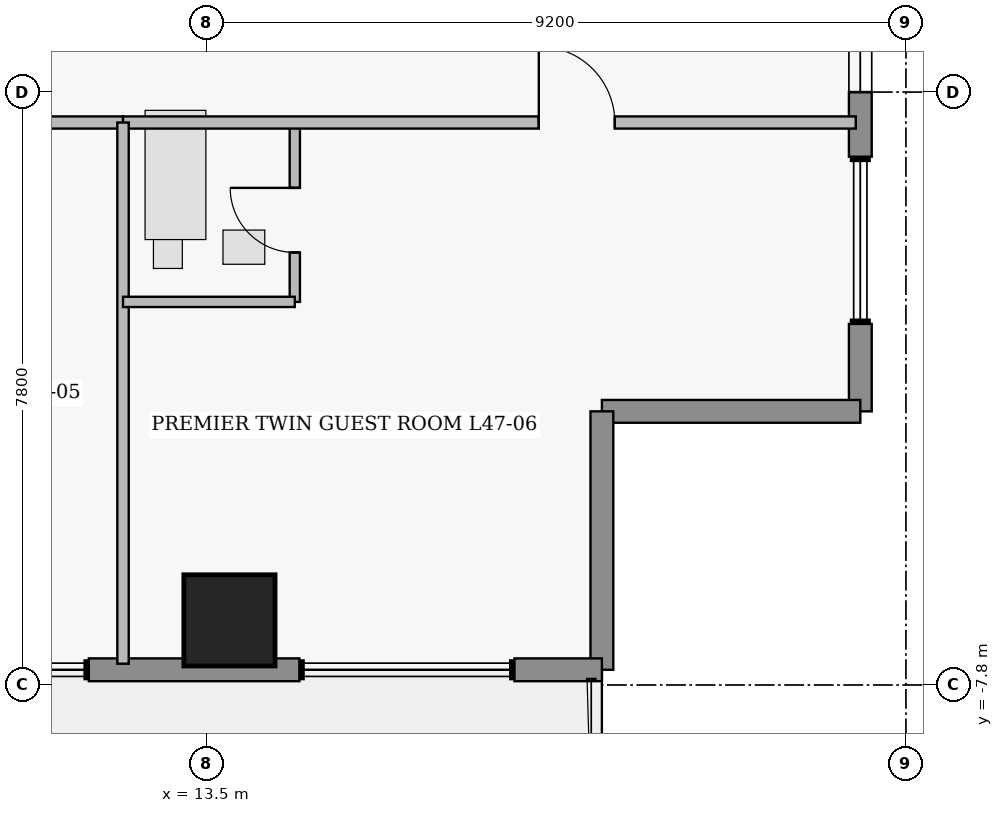
"""IFC4 building model, lengths in metres.
Left out: names, types, materials, properties, quantities, classifications, styles, units other than length and angle.
Written with IfcOpenShell. Run it as: python <this file> out.ifc"""

import sys

from ifc_helpers import new_model, si_unit, direction, frame, frame_2d, origin, origin_2d, place, context, subcontext, project, spatial, rectangle, extrude, element, fill, save


model = new_model("IFC4")
c1 = context("Model", 3, precision=1e-05, world=origin(), true_north=direction((0.0, 1.0)))
c2 = subcontext(c1, "Body", "Model", "MODEL_VIEW")
j1 = project(units=[si_unit("LENGTHUNIT", "METRE"), si_unit("PLANEANGLEUNIT", "RADIAN")], contexts=[c1])
p1 = place(None, origin())
s1 = spatial("IfcSite", under=j1, at=p1, CompositionType="ELEMENT")
p2 = place(p1, origin())
s2 = spatial("IfcBuilding", under=s1, at=p2, CompositionType="ELEMENT")
p3 = place(p2, frame((0.0, 0.0, 188.65)))
s3 = spatial("IfcBuildingStorey", under=s2, at=p3, CompositionType="ELEMENT", Elevation=188.65)
p4 = place(p3, frame((13.8, -6.95, 0.0), z_axis=(0.0, 0.0, 1.0), x_axis=(1.0, 0.0, 0.0)))
e1 = element("IfcColumn", 1, at=p4, inside=s3, PredefinedType="COLUMN", context=c2, shape_type="SweptSolid", body=[
    extrude(rectangle(XDim=1.2, YDim=1.2, at=origin_2d()), origin(), (0.0, 0.0, 1.0), 3.75),
])
p5 = place(p3, frame((22.1, 2.0, 0.0), z_axis=(0.0, 0.0, 1.0), x_axis=(0.0, -1.0, 0.0)))
e2 = element("IfcWall", 2, at=p5, inside=s3, PredefinedType="STANDARD", context=c2, shape_type="SweptSolid", body=[
    extrude(rectangle(XDim=2.85, YDim=0.3, at=frame_2d((1.425, 0.0))), origin(), (0.0, 0.0, 1.0), 3.53),
])
p6 = place(p5, frame((0.85, 0.0, 0.95)))
e3 = element("IfcOpeningElement", 3, at=p6, cuts=e2, PredefinedType="OPENING", context=c2, shape_type="SweptSolid", body=[
    extrude(rectangle(XDim=1.15, YDim=1.55, at=frame_2d((0.575, 0.775))), frame((0.0, 0.16, 0.0), z_axis=(0.0, -1.0, 0.0), x_axis=(1.0, 0.0, 0.0)), (0.0, 0.0, 1.0), 0.32),
])
p7 = place(p3, frame((22.1, -3.05, 0.0), z_axis=(0.0, 0.0, 1.0), x_axis=(0.0, -1.0, 0.0)))
e4 = element("IfcWall", 4, at=p7, inside=s3, PredefinedType="STANDARD", context=c2, shape_type="SweptSolid", body=[
    extrude(rectangle(XDim=1.15, YDim=0.3, at=frame_2d((0.575, 0.0))), origin(), (0.0, 0.0, 1.0), 3.53),
])
for number, where, z_axis, x_axis in (
    (5, (22.1, -4.2, 0.0), (0.0, 0.0, 1.0), (-1.0, 0.0, 0.0)),
    (6, (18.7, -4.2, 0.0), (0.0, 0.0, 1.0), (0.0, -1.0, 0.0)),
):
    element("IfcWall", number, at=place(p3, frame(where, z_axis=z_axis, x_axis=x_axis)), inside=s3, PredefinedType="STANDARD", context=c2, shape_type="SweptSolid", body=[
        extrude(rectangle(XDim=3.4, YDim=0.3, at=frame_2d((1.7, 0.0))), origin(), (0.0, 0.0, 1.0), 3.53),
    ])
p8 = place(p3, frame((18.7, -7.6, 0.0), z_axis=(0.0, 0.0, 1.0), x_axis=(-1.0, 0.0, 0.0)))
e7 = element("IfcWall", 7, at=p8, inside=s3, PredefinedType="STANDARD", context=c2, shape_type="SweptSolid", body=[
    extrude(rectangle(XDim=1.15, YDim=0.3, at=frame_2d((0.575, 0.0))), origin(), (0.0, 0.0, 1.0), 3.53),
])
p9 = place(p3, frame((14.72, -7.6, 0.0), z_axis=(0.0, 0.0, 1.0), x_axis=(-1.0, 0.0, 0.0)))
e8 = element("IfcWall", 8, at=p9, inside=s3, PredefinedType="STANDARD", context=c2, shape_type="SweptSolid", body=[
    extrude(rectangle(XDim=2.77, YDim=0.3, at=frame_2d((1.385, 0.0))), origin(), (0.0, 0.0, 1.0), 3.53),
])
p10 = place(p3, frame((6.2, -0.4, 0.0), z_axis=(0.0, 0.0, 1.0), x_axis=(1.0, 0.0, 0.0)))
e9 = element("IfcWall", 9, at=p10, inside=s3, PredefinedType="PARTITIONING", context=c2, shape_type="SweptSolid", body=[
    extrude(rectangle(XDim=6.2, YDim=0.16, at=frame_2d((3.1, 0.0))), origin(), (0.0, 0.0, 1.0), 3.53),
])
p11 = place(p10, frame((3.775, 0.0, 0.0)))
e10 = element("IfcOpeningElement", 10, at=p11, cuts=e9, PredefinedType="OPENING", context=c2, shape_type="SweptSolid", body=[
    extrude(rectangle(XDim=0.95, YDim=2.15, at=frame_2d((0.475, 1.075))), frame((0.0, 0.09, 0.0), z_axis=(0.0, -1.0, 0.0), x_axis=(1.0, 0.0, 0.0)), (0.0, 0.0, 1.0), 0.18),
])
p12 = place(p3, frame((14.66, -2.76, 0.0), z_axis=(0.0, 0.0, 1.0), x_axis=(0.0, 1.0, 0.0)))
e11 = element("IfcWall", 11, at=p12, inside=s3, PredefinedType="PLUMBINGWALL", context=c2, shape_type="SweptSolid", body=[
    extrude(rectangle(XDim=2.36, YDim=0.135, at=frame_2d((1.18, 0.0))), origin(), (0.0, 0.0, 1.0), 3.53),
])
p13 = place(p12, frame((0.65, 0.0, 0.0)))
e12 = element("IfcOpeningElement", 12, at=p13, cuts=e11, PredefinedType="OPENING", context=c2, shape_type="SweptSolid", body=[
    extrude(rectangle(XDim=0.85, YDim=2.1, at=frame_2d((0.425, 1.05))), frame((0.0, 0.077, 0.0), z_axis=(0.0, -1.0, 0.0), x_axis=(1.0, 0.0, 0.0)), (0.0, 0.0, 1.0), 0.155),
])
p14 = place(p3, frame((12.4, -0.4, 0.0), z_axis=(0.0, 0.0, 1.0), x_axis=(1.0, 0.0, 0.0)))
e13 = element("IfcWall", 13, at=p14, inside=s3, PredefinedType="PARTITIONING", context=c2, shape_type="SweptSolid", body=[
    extrude(rectangle(XDim=9.64, YDim=0.16, at=frame_2d((4.82, 0.0))), origin(), (0.0, 0.0, 1.0), 3.53),
])
p15 = place(p14, frame((5.47, 0.0, 0.0)))
e14 = element("IfcOpeningElement", 14, at=p15, cuts=e13, PredefinedType="OPENING", context=c2, shape_type="SweptSolid", body=[
    extrude(rectangle(XDim=1.0, YDim=2.15, at=frame_2d((0.5, 1.075))), frame((0.0, 0.09, 0.0), z_axis=(0.0, -1.0, 0.0), x_axis=(1.0, 0.0, 0.0)), (0.0, 0.0, 1.0), 0.18),
])
p16 = place(p3, frame((12.4, -7.52, 0.0), z_axis=(0.0, 0.0, 1.0), x_axis=(0.0, 1.0, 0.0)))
e15 = element("IfcWall", 15, at=p16, inside=s3, PredefinedType="PARTITIONING", context=c2, shape_type="SweptSolid", body=[
    extrude(rectangle(XDim=7.12, YDim=0.15, at=frame_2d((3.56, 0.0))), origin(), (0.0, 0.0, 1.0), 3.53),
])
p17 = place(p3, frame((12.4, -2.76, 0.0), z_axis=(0.0, 0.0, 1.0), x_axis=(1.0, 0.0, 0.0)))
e16 = element("IfcWall", 16, at=p17, inside=s3, PredefinedType="PLUMBINGWALL", context=c2, shape_type="SweptSolid", body=[
    extrude(rectangle(XDim=2.26, YDim=0.135, at=frame_2d((1.13, 0.0))), origin(), (0.0, 0.0, 1.0), 3.124),
])
p18 = place(p6, origin())
e17 = element("IfcWindow", 17, at=p18, inside=s3, PartitioningType="SINGLE_PANEL", PredefinedType="WINDOW", context=c2, shape_type="SweptSolid", body=[
    extrude(rectangle(XDim=1.15, YDim=1.55, at=frame_2d((0.575, 0.775))), frame((0.0, 0.03, 0.0), z_axis=(0.0, -1.0, 0.0), x_axis=(1.0, 0.0, 0.0)), (0.0, 0.0, 1.0), 0.06),
])
fill(e3, e17)
p19 = place(p13, origin())
e18 = element("IfcDoor", 18, at=p19, inside=s3, OperationType="SINGLE_SWING_RIGHT", PredefinedType="DOOR", context=c2, shape_type="SweptSolid", body=[
    extrude(rectangle(XDim=0.85, YDim=2.1, at=frame_2d((0.425, 1.05))), frame((0.0, 0.025, 0.0), z_axis=(0.0, -1.0, 0.0), x_axis=(1.0, 0.0, 0.0)), (0.0, 0.0, 1.0), 0.05),
])
fill(e12, e18)
p20 = place(p15, origin())
e19 = element("IfcDoor", 19, at=p20, inside=s3, OperationType="SINGLE_SWING_LEFT", PredefinedType="DOOR", context=c2, shape_type="SweptSolid", body=[
    extrude(rectangle(XDim=1.0, YDim=2.15, at=frame_2d((0.5, 1.075))), frame((0.0, 0.025, 0.0), z_axis=(0.0, -1.0, 0.0), x_axis=(1.0, 0.0, 0.0)), (0.0, 0.0, 1.0), 0.05),
])
fill(e14, e19)
save(model, sys.argv[1])
